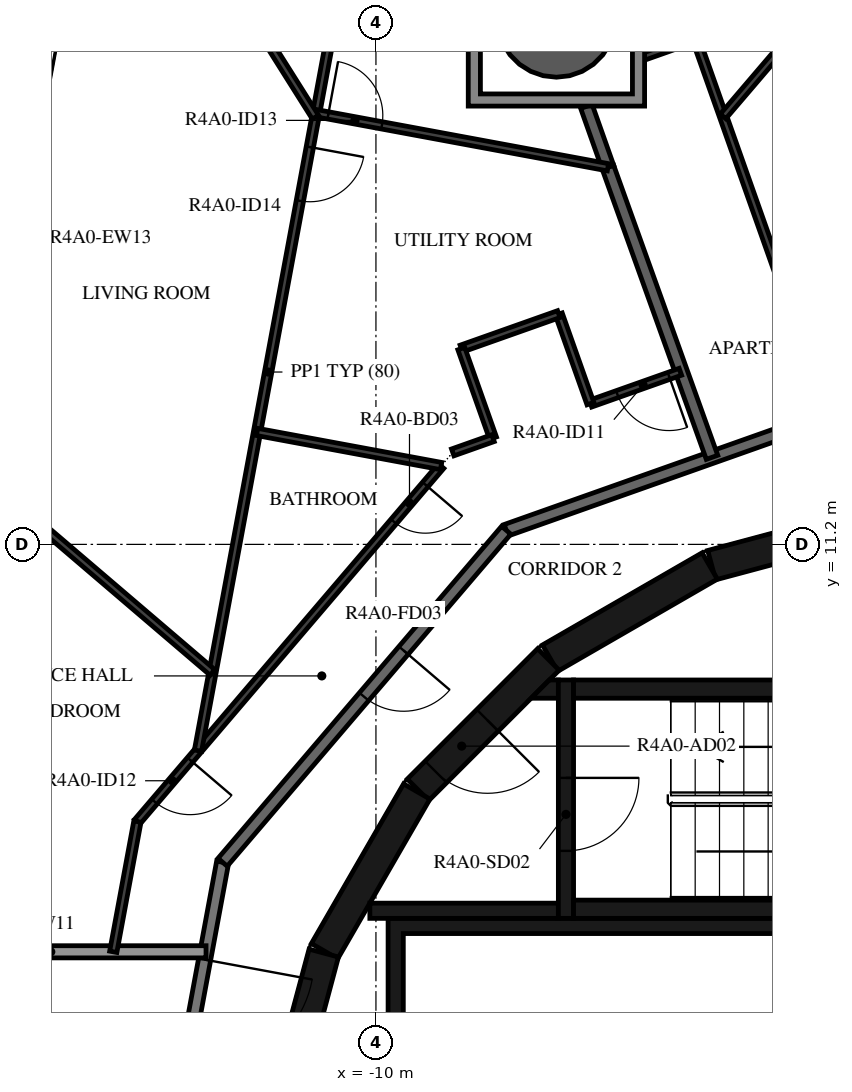
"""IFC4 building model, lengths in metres.
Left out: names, types, materials, properties, quantities, classifications, styles, units other than length and angle.
Written with IfcOpenShell. Run it as: python <this file> out.ifc"""

import sys

from ifc_helpers import new_model, si_unit, direction, frame, frame_2d, origin, origin_2d, place, context, subcontext, project, spatial, polyline, rectangle, hollow_circle, outline, extrude, element, fill, save


model = new_model("IFC4")
c1 = context("Model", 3, precision=1e-05, world=origin(), true_north=direction((0.0, 1.0)))
c2 = subcontext(c1, "Body", "Model", "MODEL_VIEW")
j1 = project(units=[si_unit("LENGTHUNIT", "METRE"), si_unit("PLANEANGLEUNIT", "RADIAN")], contexts=[c1])
p1 = place(None, origin())
s1 = spatial("IfcSite", under=j1, at=p1, CompositionType="ELEMENT")
p2 = place(p1, origin())
s2 = spatial("IfcBuilding", under=s1, at=p2, CompositionType="ELEMENT")
p3 = place(p2, frame((0.0, 0.0, 158.7)))
s3 = spatial("IfcBuildingStorey", under=s2, at=p3, CompositionType="ELEMENT", Elevation=158.7)
p4 = place(p3, frame((-7.032, 19.858, -0.38), z_axis=(0.0, 0.0, 1.0), x_axis=(1.0, 0.0, 0.0)))
e1 = element("IfcColumn", 1, at=p4, inside=s3, PredefinedType="COLUMN", context=c2, shape_type="SweptSolid", body=[
    extrude(hollow_circle(Radius=0.975, WallThickness=0.045, at=origin_2d()), origin(), (0.0, 0.0, 1.0), 3.5),
])
for number, where, z_axis, x_axis in (
    (2, (-1.55, 11.643, 0.0), (0.0, 0.0, 1.0), (-0.966, -0.259, 0.0)),
    (3, (-4.51, 10.845, 0.0), (0.0, 0.0, 1.0), (-0.866, -0.5, 0.0)),
):
    element("IfcWall", number, at=place(p3, frame(where, z_axis=z_axis, x_axis=x_axis)), inside=s3, PredefinedType="SHEAR", context=c2, shape_type="SweptSolid", body=[
        extrude(rectangle(XDim=3.033, YDim=0.5, at=frame_2d((1.516, 0.0))), origin(), (0.0, 0.0, 1.0), 3.12),
    ])
p5 = place(p3, frame((-7.164, 9.308, 0.0), z_axis=(0.0, 0.0, 1.0), x_axis=(-0.707106781187, -0.707106781187, 0.0)))
e4 = element("IfcWall", 4, at=p5, inside=s3, PredefinedType="SHEAR", context=c2, shape_type="SweptSolid", body=[
    extrude(rectangle(XDim=3.032, YDim=0.5, at=frame_2d((1.516, 0.0))), origin(), (0.0, 0.0, 1.0), 3.12),
])
p6 = place(p5, frame((1.416, 0.0, 0.0)))
e5 = element("IfcOpeningElement", 5, at=p6, cuts=e4, PredefinedType="OPENING", context=c2, shape_type="SweptSolid", body=[
    extrude(rectangle(XDim=1.2, YDim=2.1, at=frame_2d((0.6, 1.05))), frame((0.0, 0.26, 0.0), z_axis=(0.0, -1.0, 0.0), x_axis=(1.0, 0.0, 0.0)), (0.0, 0.0, 1.0), 0.52),
])
for number, where, z_axis, x_axis in (
    (6, (-9.329, 7.137, 0.0), (0.0, 0.0, 1.0), (-0.5, -0.866, 0.0)),
    (7, (-10.858, 4.479, 0.0), (0.0, 0.0, 1.0), (-0.259, -0.966, 0.0)),
):
    element("IfcWall", number, at=place(p3, frame(where, z_axis=z_axis, x_axis=x_axis)), inside=s3, PredefinedType="SHEAR", context=c2, shape_type="SweptSolid", body=[
        extrude(rectangle(XDim=3.033, YDim=0.5, at=frame_2d((1.516, 0.0))), origin(), (0.0, 0.0, 1.0), 3.12),
    ])
for number, where, z_axis, x_axis in (
    (8, (-6.75, 5.2, 0.0), (0.0, 0.0, 1.0), (1.0, 0.0, 0.0)),
    (9, (-6.75, 8.82, 0.0), (0.0, 0.0, 1.0), (1.0, 0.0, 0.0)),
):
    element("IfcWall", number, at=place(p3, frame(where, z_axis=z_axis, x_axis=x_axis)), inside=s3, PredefinedType="SHEAR", context=c2, shape_type="SweptSolid", body=[
        extrude(rectangle(XDim=6.75, YDim=0.3, at=frame_2d((3.375, 0.0))), origin(), (0.0, 0.0, 1.0), 3.12),
    ])
p7 = place(p3, frame((-6.875, 8.97, 0.0), z_axis=(0.0, 0.0, 1.0), x_axis=(0.0, -1.0, 0.0)))
e10 = element("IfcWall", 10, at=p7, inside=s3, PredefinedType="SHEAR", context=c2, shape_type="SweptSolid", body=[
    extrude(rectangle(XDim=3.92, YDim=0.25, at=frame_2d((1.96, 0.0))), origin(), (0.0, 0.0, 1.0), 3.12),
])
p8 = place(p7, frame((1.61, 0.0, 0.0)))
e11 = element("IfcOpeningElement", 11, at=p8, cuts=e10, PredefinedType="OPENING", context=c2, shape_type="SweptSolid", body=[
    extrude(rectangle(XDim=1.2, YDim=2.1, at=frame_2d((0.6, 1.05))), frame((0.0, 0.135, 0.0), z_axis=(0.0, -1.0, 0.0), x_axis=(1.0, 0.0, 0.0)), (0.0, 0.0, 1.0), 0.27),
])
p9 = place(p3, frame((-7.0, 5.175, 0.0), z_axis=(0.0, 0.0, 1.0), x_axis=(-1.0, 0.0, 0.0)))
e12 = element("IfcWall", 12, at=p9, inside=s3, PredefinedType="SHEAR", context=c2, shape_type="SweptSolid", body=[
    extrude(rectangle(XDim=3.1, YDim=0.25, at=frame_2d((1.55, 0.0))), origin(), (0.0, 0.0, 1.0), 3.12),
])
p10 = place(p3, origin())
e13 = element("IfcWall", 13, at=p10, inside=s3, PredefinedType="SHEAR", context=c2, shape_type="SweptSolid", body=[
    extrude(outline(polyline([(-7.148, 8.97), (-7.0, 8.97), (-7.0, 8.67), (-7.448, 8.67), (-7.148, 8.97)])), origin(), (0.0, 0.0, 1.0), 3.12),
])
p11 = place(p3, origin())
e14 = element("IfcWall", 14, at=p11, inside=s3, PredefinedType="SHEAR", context=c2, shape_type="SweptSolid", body=[
    extrude(outline(polyline([(-9.55, 4.8), (-1.2, 4.8), (-1.2, 1.9), (-0.95, 1.9), (-0.95, 4.8), (0.95, 4.8), (0.95, 1.9), (1.2, 1.9), (1.2, 4.8), (3.1, 4.8), (3.1, 1.9), (3.35, 1.9), (3.35, 4.8), (5.25, 4.8), (5.25, 1.9), (5.5, 1.9), (5.5, 4.8), (7.4, 4.8), (7.4, 1.9), (7.65, 1.9), (7.65, 4.8), (9.55, 4.8), (9.55, 1.9), (9.8, 1.9), (9.8, 4.8), (9.8, 5.05), (-9.8, 5.05), (-9.8, 4.8), (-9.8, 1.9), (-9.55, 1.9), (-9.55, 4.8)])), origin(), (0.0, 0.0, 1.0), 3.12),
])
p12 = place(p3, frame((-12.521, 5.972, 0.0), z_axis=(0.0, 0.0, 1.0), x_axis=(-0.182251559718, -0.983251935661, 0.0)))
e15 = element("IfcWall", 15, at=p12, inside=s3, PredefinedType="STANDARD", context=c2, shape_type="SweptSolid", body=[
    extrude(rectangle(XDim=5.117, YDim=0.2, at=frame_2d((2.559, 0.0))), origin(), (0.0, 0.0, 1.0), 3.12),
])
p13 = place(p12, frame((1.627, 0.0, 0.0)))
e16 = element("IfcOpeningElement", 16, at=p13, cuts=e15, PredefinedType="OPENING", context=c2, shape_type="SweptSolid", body=[
    extrude(rectangle(XDim=1.8, YDim=2.1, at=frame_2d((0.9, 1.05))), frame((0.0, 0.11, 0.0), z_axis=(0.0, -1.0, 0.0), x_axis=(1.0, 0.0, 0.0)), (0.0, 0.0, 1.0), 0.22),
])
p14 = place(p3, frame((-2.359, 13.38, 0.0), z_axis=(0.0, 0.0, 1.0), x_axis=(-0.942647529236, -0.333789807551, 0.0)))
e17 = element("IfcWall", 17, at=p14, inside=s3, PredefinedType="STANDARD", context=c2, shape_type="SweptSolid", body=[
    extrude(rectangle(XDim=5.833, YDim=0.2, at=frame_2d((2.917, 0.0))), origin(), (0.0, 0.0, 1.0), 3.12),
])
p15 = place(p3, frame((-7.858, 11.433, 0.0), z_axis=(0.0, 0.0, 1.0), x_axis=(-0.649440801937, -0.760412154545, 0.0)))
e18 = element("IfcWall", 18, at=p15, inside=s3, PredefinedType="STANDARD", context=c2, shape_type="SweptSolid", body=[
    extrude(rectangle(XDim=7.181, YDim=0.2, at=frame_2d((3.59, 0.0))), origin(), (0.0, 0.0, 1.0), 3.12),
])
p16 = place(p15, frame((2.6, 0.0, 0.0)))
e19 = element("IfcOpeningElement", 19, at=p16, cuts=e18, PredefinedType="OPENING", context=c2, shape_type="SweptSolid", body=[
    extrude(rectangle(XDim=1.0, YDim=2.1, at=frame_2d((0.5, 1.05))), frame((0.0, 0.11, 0.0), z_axis=(0.0, -1.0, 0.0), x_axis=(1.0, 0.0, 0.0)), (0.0, 0.0, 1.0), 0.22),
])
p17 = place(p3, frame((-12.794, 4.5, 0.0), z_axis=(0.0, 0.0, 1.0), x_axis=(-1.0, 0.0, 0.0)))
e20 = element("IfcWall", 20, at=p17, inside=s3, PredefinedType="STANDARD", context=c2, shape_type="SweptSolid", body=[
    extrude(rectangle(XDim=5.106, YDim=0.2, at=frame_2d((2.553, 0.0))), origin(), (0.0, 0.0, 1.0), 2.73),
])
p18 = place(p3, frame((-6.185, 17.402, 0.0), z_axis=(0.0, 0.0, 1.0), x_axis=(0.337736730281, -0.941240618024, 0.0)))
e21 = element("IfcWall", 21, at=p18, inside=s3, PredefinedType="STANDARD", context=c2, shape_type="SweptSolid", body=[
    extrude(rectangle(XDim=5.068, YDim=0.2, at=frame_2d((2.534, 0.0))), origin(), (0.0, 0.0, 1.0), 3.12),
])
p19 = place(p3, frame((-6.539, 18.403, 0.0), z_axis=(0.0, 0.0, 1.0), x_axis=(0.333625806098, -0.942705585804, 0.0)))
e22 = element("IfcWall", 22, at=p19, inside=s3, PredefinedType="STANDARD", context=c2, shape_type="SweptSolid", body=[
    extrude(rectangle(XDim=1.062, YDim=0.2, at=frame_2d((0.531, 0.0))), origin(), (0.0, 0.0, 1.0), 3.12),
])
p20 = place(p3, frame((8.702, 12.206, 0.0), z_axis=(0.0, 0.0, 1.0), x_axis=(-0.760401313718, 0.649453494945, 0.0)))
e23 = element("IfcWall", 23, at=p20, inside=s3, PredefinedType="PARTITIONING", context=c2, shape_type="SweptSolid", body=[
    extrude(rectangle(XDim=16.724, YDim=0.12, at=frame_2d((8.362, 0.0))), origin(), (0.0, 0.0, 1.0), 3.12),
])
p21 = place(p20, frame((0.2, 0.0, 0.0)))
e24 = element("IfcOpeningElement", 24, at=p21, cuts=e23, PredefinedType="OPENING", context=c2, shape_type="SweptSolid", body=[
    extrude(rectangle(XDim=0.9, YDim=2.1, at=frame_2d((0.45, 1.05))), frame((0.0, 0.07, 0.0), z_axis=(0.0, -1.0, 0.0), x_axis=(1.0, 0.0, 0.0)), (0.0, 0.0, 1.0), 0.14),
])
p22 = place(p20, frame((7.099, 0.0, 0.0)))
e25 = element("IfcOpeningElement", 25, at=p22, cuts=e23, PredefinedType="OPENING", context=c2, shape_type="SweptSolid", body=[
    extrude(rectangle(XDim=0.9, YDim=2.1, at=frame_2d((0.45, 1.05))), frame((0.0, 0.07, 0.0), z_axis=(0.0, -1.0, 0.0), x_axis=(1.0, 0.0, 0.0)), (0.0, 0.0, 1.0), 0.14),
])
p23 = place(p3, frame((-3.048, 14.727, 0.0), z_axis=(0.0, 0.0, 1.0), x_axis=(-0.333811603187, 0.942639811157, 0.0)))
e26 = element("IfcWall", 26, at=p23, inside=s3, PredefinedType="PARTITIONING", context=c2, shape_type="SweptSolid", body=[
    extrude(rectangle(XDim=5.087, YDim=0.12, at=frame_2d((2.543, 0.0))), origin(), (0.0, 0.0, 1.0), 3.12),
])
p24 = place(p3, frame((-4.689, 19.542, 0.0), z_axis=(0.0, 0.0, 1.0), x_axis=(-0.942661851862, -0.33374935662, 0.0)))
e27 = element("IfcWall", 27, at=p24, inside=s3, PredefinedType="PARTITIONING", context=c2, shape_type="SweptSolid", body=[
    extrude(rectangle(XDim=1.017, YDim=0.12, at=frame_2d((0.508, 0.0))), origin(), (0.0, 0.0, 1.0), 3.12),
])
p25 = place(p3, frame((-1.79, 21.167, 0.0), z_axis=(0.0, 0.0, 1.0), x_axis=(-0.649427819186, -0.760423242456, 0.0)))
e28 = element("IfcWall", 28, at=p25, inside=s3, PredefinedType="PARTITIONING", context=c2, shape_type="SweptSolid", body=[
    extrude(rectangle(XDim=3.851, YDim=0.12, at=frame_2d((1.926, 0.0))), origin(), (0.0, 0.0, 1.0), 3.12),
])
p26 = place(p25, frame((0.2, 0.0, 0.0)))
e29 = element("IfcOpeningElement", 29, at=p26, cuts=e28, PredefinedType="OPENING", context=c2, shape_type="SweptSolid", body=[
    extrude(rectangle(XDim=0.9, YDim=2.1, at=frame_2d((0.45, 1.05))), frame((0.0, 0.07, 0.0), z_axis=(0.0, -1.0, 0.0), x_axis=(1.0, 0.0, 0.0)), (0.0, 0.0, 1.0), 0.14),
])
p27 = place(p3, frame((-4.993, 14.038, 0.0), z_axis=(0.0, 0.0, 1.0), x_axis=(-0.942685371668, -0.333682918418, 0.0)))
e30 = element("IfcWall", 30, at=p27, inside=s3, PredefinedType="PARTITIONING", context=c2, shape_type="SweptSolid", body=[
    extrude(rectangle(XDim=1.569, YDim=0.12, at=frame_2d((0.784, 0.0))), origin(), (0.0, 0.0, 1.0), 3.12),
])
p28 = place(p27, frame((0.2, 0.0, 0.0)))
e31 = element("IfcOpeningElement", 31, at=p28, cuts=e30, PredefinedType="OPENING", context=c2, shape_type="SweptSolid", body=[
    extrude(rectangle(XDim=0.9, YDim=2.1, at=frame_2d((0.45, 1.05))), frame((0.0, 0.07, 0.0), z_axis=(0.0, -1.0, 0.0), x_axis=(1.0, 0.0, 0.0)), (0.0, 0.0, 1.0), 0.14),
])
p29 = place(p3, frame((-6.472, 13.515, 0.0), z_axis=(0.0, 0.0, 1.0), x_axis=(-0.333809516424, 0.942640550127, 0.0)))
e32 = element("IfcWall", 32, at=p29, inside=s3, PredefinedType="PARTITIONING", context=c2, shape_type="SweptSolid", body=[
    extrude(rectangle(XDim=1.562, YDim=0.12, at=frame_2d((0.781, 0.0))), origin(), (0.0, 0.0, 1.0), 3.12),
])
p30 = place(p3, frame((-6.993, 14.987, 0.0), z_axis=(0.0, 0.0, 1.0), x_axis=(-0.942599915297, -0.33392424243, 0.0)))
e33 = element("IfcWall", 33, at=p30, inside=s3, PredefinedType="PARTITIONING", context=c2, shape_type="SweptSolid", body=[
    extrude(rectangle(XDim=1.7, YDim=0.12, at=frame_2d((0.85, 0.0))), origin(), (0.0, 0.0, 1.0), 3.12),
])
p31 = place(p3, frame((-8.596, 14.419, 0.0), z_axis=(0.0, 0.0, 1.0), x_axis=(0.333670576497, -0.942689740254, 0.0)))
e34 = element("IfcWall", 34, at=p31, inside=s3, PredefinedType="PARTITIONING", context=c2, shape_type="SweptSolid", body=[
    extrude(rectangle(XDim=1.562, YDim=0.12, at=frame_2d((0.781, 0.0))), origin(), (0.0, 0.0, 1.0), 3.12),
])
p32 = place(p3, frame((-8.075, 12.947, 0.0), z_axis=(0.0, 0.0, 1.0), x_axis=(-0.942649994227, -0.33378284615, 0.0)))
e35 = element("IfcWall", 35, at=p32, inside=s3, PredefinedType="PARTITIONING", context=c2, shape_type="SweptSolid", body=[
    extrude(rectangle(XDim=0.703, YDim=0.12, at=frame_2d((0.352, 0.0))), origin(), (0.0, 0.0, 1.0), 3.12),
])
p33 = place(p3, frame((-8.929, 12.488, 0.0), z_axis=(0.0, 0.0, 1.0), x_axis=(-0.64944646045, -0.760407321775, 0.0)))
e36 = element("IfcWall", 36, at=p33, inside=s3, PredefinedType="PARTITIONING", context=c2, shape_type="SweptSolid", body=[
    extrude(rectangle(XDim=7.69, YDim=0.12, at=frame_2d((3.845, 0.0))), origin(), (0.0, 0.0, 1.0), 3.12),
])
p34 = place(p33, frame((0.4, 0.0, 0.0)))
e37 = element("IfcOpeningElement", 37, at=p34, cuts=e36, PredefinedType="OPENING", context=c2, shape_type="SweptSolid", body=[
    extrude(rectangle(XDim=0.8, YDim=2.1, at=frame_2d((0.4, 1.05))), frame((0.0, 0.07, 0.0), z_axis=(0.0, -1.0, 0.0), x_axis=(1.0, 0.0, 0.0)), (0.0, 0.0, 1.0), 0.14),
])
p35 = place(p33, frame((6.356, 0.0, 0.0)))
e38 = element("IfcOpeningElement", 38, at=p35, cuts=e36, PredefinedType="OPENING", context=c2, shape_type="SweptSolid", body=[
    extrude(rectangle(XDim=0.9, YDim=2.1, at=frame_2d((0.45, 1.05))), frame((0.0, 0.07, 0.0), z_axis=(0.0, -1.0, 0.0), x_axis=(1.0, 0.0, 0.0)), (0.0, 0.0, 1.0), 0.14),
])
p36 = place(p3, frame((-13.923, 6.641, 0.0), z_axis=(0.0, 0.0, 1.0), x_axis=(-0.182209715759, -0.983259690765, 0.0)))
e39 = element("IfcWall", 39, at=p36, inside=s3, PredefinedType="PARTITIONING", context=c2, shape_type="SweptSolid", body=[
    extrude(rectangle(XDim=2.177, YDim=0.12, at=frame_2d((1.089, 0.0))), origin(), (0.0, 0.0, 1.0), 3.12),
])
p37 = place(p3, frame((-10.618, 20.262, 0.0), z_axis=(0.0, 0.0, 1.0), x_axis=(-0.182222468274, -0.983257327487, 0.0)))
e40 = element("IfcWall", 40, at=p37, inside=s3, PredefinedType="PARTITIONING", context=c2, shape_type="SweptSolid", body=[
    extrude(rectangle(XDim=12.667, YDim=0.12, at=frame_2d((6.333, 0.0))), origin(), (0.0, 0.0, 1.0), 3.12),
])
p38 = place(p37, frame((2.57, 0.0, 0.0)))
e41 = element("IfcOpeningElement", 41, at=p38, cuts=e40, PredefinedType="OPENING", context=c2, shape_type="SweptSolid", body=[
    extrude(rectangle(XDim=0.9, YDim=2.1, at=frame_2d((0.45, 1.05))), frame((0.0, 0.07, 0.0), z_axis=(0.0, -1.0, 0.0), x_axis=(1.0, 0.0, 0.0)), (0.0, 0.0, 1.0), 0.14),
])
p39 = place(p3, frame((-10.984, 18.291, 0.0), z_axis=(0.0, 0.0, 1.0), x_axis=(0.98324782266, -0.182273748068, 0.0)))
e42 = element("IfcWall", 42, at=p39, inside=s3, PredefinedType="PARTITIONING", context=c2, shape_type="SweptSolid", body=[
    extrude(rectangle(XDim=4.881, YDim=0.12, at=frame_2d((2.44, 0.0))), origin(), (0.0, 0.0, 1.0), 3.12),
])
p40 = place(p39, frame((0.2, 0.0, 0.0)))
e43 = element("IfcOpeningElement", 43, at=p40, cuts=e42, PredefinedType="OPENING", context=c2, shape_type="SweptSolid", body=[
    extrude(rectangle(XDim=0.9, YDim=2.1, at=frame_2d((0.45, 1.05))), frame((0.0, 0.07, 0.0), z_axis=(0.0, -1.0, 0.0), x_axis=(1.0, 0.0, 0.0)), (0.0, 0.0, 1.0), 0.14),
])
p41 = place(p3, frame((-14.211, 23.326, 0.0), z_axis=(0.0, 0.0, 1.0), x_axis=(0.533278244906, -0.845939899467, 0.0)))
e44 = element("IfcWall", 44, at=p41, inside=s3, PredefinedType="PARTITIONING", context=c2, shape_type="SweptSolid", body=[
    extrude(rectangle(XDim=6.029, YDim=0.12, at=frame_2d((3.014, 0.0))), origin(), (0.0, 0.0, 1.0), 3.12),
])
p42 = place(p41, frame((0.6, 0.0, 0.0)))
e45 = element("IfcOpeningElement", 45, at=p42, cuts=e44, PredefinedType="OPENING", context=c2, shape_type="SweptSolid", body=[
    extrude(rectangle(XDim=0.9, YDim=2.1, at=frame_2d((0.45, 1.05))), frame((0.0, 0.07, 0.0), z_axis=(0.0, -1.0, 0.0), x_axis=(1.0, 0.0, 0.0)), (0.0, 0.0, 1.0), 0.14),
])
p43 = place(p3, frame((-11.955, 13.049, 0.0), z_axis=(0.0, 0.0, 1.0), x_axis=(0.983247271586, -0.182276720725, 0.0)))
e46 = element("IfcWall", 46, at=p43, inside=s3, PredefinedType="PARTITIONING", context=c2, shape_type="SweptSolid", body=[
    extrude(rectangle(XDim=3.078, YDim=0.12, at=frame_2d((1.539, 0.0))), origin(), (0.0, 0.0, 1.0), 3.12),
])
p44 = place(p3, frame((-16.552, 12.394, 0.0), z_axis=(0.0, 0.0, 1.0), x_axis=(0.760425586578, -0.649425074414, 0.0)))
e47 = element("IfcWall", 47, at=p44, inside=s3, PredefinedType="PARTITIONING", context=c2, shape_type="SweptSolid", body=[
    extrude(rectangle(XDim=5.081, YDim=0.12, at=frame_2d((2.541, 0.0))), origin(), (0.0, 0.0, 1.0), 3.12),
])
p45 = place(p3, origin())
e48 = element("IfcWall", 48, at=p45, inside=s3, PredefinedType="STANDARD", context=c2, shape_type="SweptSolid", body=[
    extrude(outline(polyline([(-5.582, 21.308), (-5.582, 18.408), (-8.482, 18.408), (-8.482, 21.308), (-5.582, 21.308)]), holes=[polyline([(-8.282, 18.608), (-5.782, 18.608), (-5.782, 21.108), (-8.282, 21.108), (-8.282, 18.608)])]), origin(), (0.0, 0.0, 1.0), 3.12),
])
p46 = place(p8, origin())
e49 = element("IfcDoor", 49, at=p46, inside=s3, OperationType="SINGLE_SWING_LEFT", PredefinedType="DOOR", context=c2, shape_type="SweptSolid", body=[
    extrude(rectangle(XDim=1.2, YDim=2.1, at=frame_2d((0.6, 1.05))), frame((0.0, 0.025, 0.0), z_axis=(0.0, -1.0, 0.0), x_axis=(1.0, 0.0, 0.0)), (0.0, 0.0, 1.0), 0.05),
])
fill(e11, e49)
p47 = place(p6, origin())
e50 = element("IfcDoor", 50, at=p47, inside=s3, OperationType="SINGLE_SWING_RIGHT", PredefinedType="DOOR", context=c2, shape_type="SweptSolid", body=[
    extrude(rectangle(XDim=1.2, YDim=2.1, at=frame_2d((0.6, 1.05))), frame((0.0, 0.025, 0.0), z_axis=(0.0, -1.0, 0.0), x_axis=(1.0, 0.0, 0.0)), (0.0, 0.0, 1.0), 0.05),
])
fill(e5, e50)
p48 = place(p16, origin())
e51 = element("IfcDoor", 51, at=p48, inside=s3, OperationType="SINGLE_SWING_LEFT", PredefinedType="DOOR", context=c2, shape_type="SweptSolid", body=[
    extrude(rectangle(XDim=1.0, YDim=2.1, at=frame_2d((0.5, 1.05))), frame((0.0, 0.025, 0.0), z_axis=(0.0, -1.0, 0.0), x_axis=(1.0, 0.0, 0.0)), (0.0, 0.0, 1.0), 0.05),
])
fill(e19, e51)
p49 = place(p28, origin())
e52 = element("IfcDoor", 52, at=p49, inside=s3, OperationType="SINGLE_SWING_LEFT", PredefinedType="DOOR", context=c2, shape_type="SweptSolid", body=[
    extrude(rectangle(XDim=0.9, YDim=2.1, at=frame_2d((0.45, 1.05))), frame((0.0, 0.025, 0.0), z_axis=(0.0, -1.0, 0.0), x_axis=(1.0, 0.0, 0.0)), (0.0, 0.0, 1.0), 0.05),
])
fill(e31, e52)
p50 = place(p34, origin())
e53 = element("IfcDoor", 53, at=p50, inside=s3, OperationType="SINGLE_SWING_LEFT", PredefinedType="DOOR", context=c2, shape_type="SweptSolid", body=[
    extrude(rectangle(XDim=0.8, YDim=2.1, at=frame_2d((0.4, 1.05))), frame((0.0, 0.025, 0.0), z_axis=(0.0, -1.0, 0.0), x_axis=(1.0, 0.0, 0.0)), (0.0, 0.0, 1.0), 0.05),
])
fill(e37, e53)
p51 = place(p35, origin())
e54 = element("IfcDoor", 54, at=p51, inside=s3, OperationType="SINGLE_SWING_LEFT", PredefinedType="DOOR", context=c2, shape_type="SweptSolid", body=[
    extrude(rectangle(XDim=0.9, YDim=2.1, at=frame_2d((0.45, 1.05))), frame((0.0, 0.025, 0.0), z_axis=(0.0, -1.0, 0.0), x_axis=(1.0, 0.0, 0.0)), (0.0, 0.0, 1.0), 0.05),
])
fill(e38, e54)
p52 = place(p40, origin())
e55 = element("IfcDoor", 55, at=p52, inside=s3, OperationType="SINGLE_SWING_LEFT", PredefinedType="DOOR", context=c2, shape_type="SweptSolid", body=[
    extrude(rectangle(XDim=0.9, YDim=2.1, at=frame_2d((0.45, 1.05))), frame((0.0, 0.025, 0.0), z_axis=(0.0, -1.0, 0.0), x_axis=(1.0, 0.0, 0.0)), (0.0, 0.0, 1.0), 0.05),
])
fill(e43, e55)
p53 = place(p38, origin())
e56 = element("IfcDoor", 56, at=p53, inside=s3, OperationType="SINGLE_SWING_LEFT", PredefinedType="DOOR", context=c2, shape_type="SweptSolid", body=[
    extrude(rectangle(XDim=0.9, YDim=2.1, at=frame_2d((0.45, 1.05))), frame((0.0, 0.025, 0.0), z_axis=(0.0, -1.0, 0.0), x_axis=(1.0, 0.0, 0.0)), (0.0, 0.0, 1.0), 0.05),
])
fill(e41, e56)
p54 = place(p13, origin())
e57 = element("IfcDoor", 57, at=p54, inside=s3, OperationType="DOUBLE_DOOR_SINGLE_SWING", PredefinedType="DOOR", context=c2, shape_type="SweptSolid", body=[
    extrude(rectangle(XDim=1.8, YDim=2.1, at=frame_2d((0.9, 1.05))), frame((0.0, 0.025, 0.0), z_axis=(0.0, -1.0, 0.0), x_axis=(1.0, 0.0, 0.0)), (0.0, 0.0, 1.0), 0.05),
])
fill(e16, e57)
save(model, sys.argv[1])
